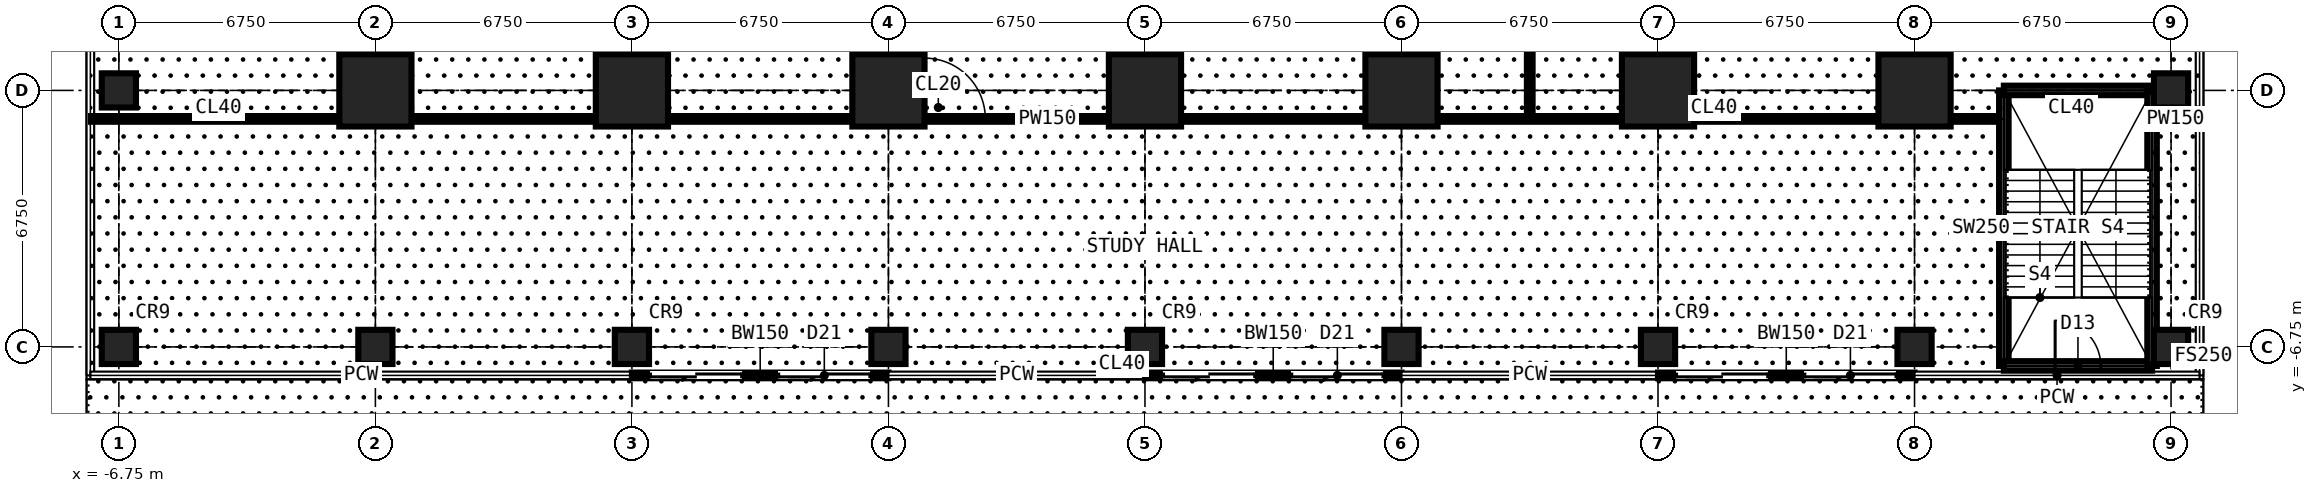
"""IFC4 building model, lengths in metres.
Left out: names, types, materials, properties, quantities, classifications, styles, units other than length and angle.
Written with IfcOpenShell. Run it as: python <this file> out.ifc"""

import sys

from ifc_helpers import new_model, si_unit, direction, frame, frame_2d, origin, origin_with_axes, origin_2d, place, context, subcontext, project, spatial, rectangle, circle, extrude, element, fill, save


model = new_model("IFC4")
c1 = context("Model", 3, precision=1e-05, world=origin(), true_north=direction((0.0, 1.0)))
c2 = subcontext(c1, "Body", "Model", "MODEL_VIEW")
j1 = project(units=[si_unit("LENGTHUNIT", "METRE"), si_unit("PLANEANGLEUNIT", "RADIAN")], contexts=[c1])
p1 = place(None, origin())
s1 = spatial("IfcSite", under=j1, at=p1, CompositionType="ELEMENT")
p2 = place(p1, origin())
s2 = spatial("IfcBuilding", under=s1, at=p2, CompositionType="ELEMENT")
p3 = place(p2, frame((0.0, 0.0, 9.0)))
s3 = spatial("IfcBuildingStorey", under=s2, at=p3, CompositionType="ELEMENT", Elevation=9.0)
for number, where, z_axis, x_axis in (
    (1, (-6.75, -6.75, 0.0), (0.0, 0.0, 1.0), (1.0, 0.0, 0.0)),
    (2, (-6.75, 0.0, 0.0), (0.0, 0.0, 1.0), (1.0, 0.0, 0.0)),
    (3, (0.0, -6.75, 0.0), (0.0, 0.0, 1.0), (1.0, 0.0, 0.0)),
):
    element("IfcColumn", number, at=place(p3, frame(where, z_axis=z_axis, x_axis=x_axis)), inside=s3, PredefinedType="COLUMN", context=c2, shape_type="SweptSolid", body=[
        extrude(circle(Radius=0.45, at=origin_2d()), origin(), (0.0, 0.0, 1.0), 4.5),
    ])
p4 = place(p3, origin_with_axes())
e4 = element("IfcColumn", 4, at=p4, inside=s3, PredefinedType="COLUMN", context=c2, shape_type="SweptSolid", body=[
    extrude(rectangle(XDim=1.9, YDim=1.9, at=origin_2d()), origin(), (0.0, 0.0, 1.0), 4.5),
])
p5 = place(p3, frame((6.75, -6.75, 0.0), z_axis=(0.0, 0.0, 1.0), x_axis=(1.0, 0.0, 0.0)))
e5 = element("IfcColumn", 5, at=p5, inside=s3, PredefinedType="COLUMN", context=c2, shape_type="SweptSolid", body=[
    extrude(circle(Radius=0.45, at=origin_2d()), origin(), (0.0, 0.0, 1.0), 4.5),
])
p6 = place(p3, frame((6.75, 0.0, 0.0), z_axis=(0.0, 0.0, 1.0), x_axis=(1.0, 0.0, 0.0)))
e6 = element("IfcColumn", 6, at=p6, inside=s3, PredefinedType="COLUMN", context=c2, shape_type="SweptSolid", body=[
    extrude(rectangle(XDim=1.9, YDim=1.9, at=origin_2d()), origin(), (0.0, 0.0, 1.0), 4.5),
])
p7 = place(p3, frame((13.5, -6.75, 0.0), z_axis=(0.0, 0.0, 1.0), x_axis=(1.0, 0.0, 0.0)))
e7 = element("IfcColumn", 7, at=p7, inside=s3, PredefinedType="COLUMN", context=c2, shape_type="SweptSolid", body=[
    extrude(circle(Radius=0.45, at=origin_2d()), origin(), (0.0, 0.0, 1.0), 4.5),
])
p8 = place(p3, frame((13.5, 0.0, 0.0), z_axis=(0.0, 0.0, 1.0), x_axis=(1.0, 0.0, 0.0)))
e8 = element("IfcColumn", 8, at=p8, inside=s3, PredefinedType="COLUMN", context=c2, shape_type="SweptSolid", body=[
    extrude(rectangle(XDim=1.9, YDim=1.9, at=origin_2d()), origin(), (0.0, 0.0, 1.0), 4.5),
])
p9 = place(p3, frame((20.25, -6.75, 0.0), z_axis=(0.0, 0.0, 1.0), x_axis=(1.0, 0.0, 0.0)))
e9 = element("IfcColumn", 9, at=p9, inside=s3, PredefinedType="COLUMN", context=c2, shape_type="SweptSolid", body=[
    extrude(circle(Radius=0.45, at=origin_2d()), origin(), (0.0, 0.0, 1.0), 4.5),
])
p10 = place(p3, frame((20.25, 0.0, 0.0), z_axis=(0.0, 0.0, 1.0), x_axis=(1.0, 0.0, 0.0)))
e10 = element("IfcColumn", 10, at=p10, inside=s3, PredefinedType="COLUMN", context=c2, shape_type="SweptSolid", body=[
    extrude(rectangle(XDim=1.9, YDim=1.9, at=origin_2d()), origin(), (0.0, 0.0, 1.0), 4.5),
])
p11 = place(p3, frame((27.0, -6.75, 0.0), z_axis=(0.0, 0.0, 1.0), x_axis=(1.0, 0.0, 0.0)))
e11 = element("IfcColumn", 11, at=p11, inside=s3, PredefinedType="COLUMN", context=c2, shape_type="SweptSolid", body=[
    extrude(circle(Radius=0.45, at=origin_2d()), origin(), (0.0, 0.0, 1.0), 4.5),
])
p12 = place(p3, frame((27.0, 0.0, 0.0), z_axis=(0.0, 0.0, 1.0), x_axis=(1.0, 0.0, 0.0)))
e12 = element("IfcColumn", 12, at=p12, inside=s3, PredefinedType="COLUMN", context=c2, shape_type="SweptSolid", body=[
    extrude(rectangle(XDim=1.9, YDim=1.9, at=origin_2d()), origin(), (0.0, 0.0, 1.0), 4.5),
])
p13 = place(p3, frame((33.75, -6.75, 0.0), z_axis=(0.0, 0.0, 1.0), x_axis=(1.0, 0.0, 0.0)))
e13 = element("IfcColumn", 13, at=p13, inside=s3, PredefinedType="COLUMN", context=c2, shape_type="SweptSolid", body=[
    extrude(circle(Radius=0.45, at=origin_2d()), origin(), (0.0, 0.0, 1.0), 4.5),
])
p14 = place(p3, frame((33.75, 0.0, 0.0), z_axis=(0.0, 0.0, 1.0), x_axis=(1.0, 0.0, 0.0)))
e14 = element("IfcColumn", 14, at=p14, inside=s3, PredefinedType="COLUMN", context=c2, shape_type="SweptSolid", body=[
    extrude(rectangle(XDim=1.9, YDim=1.9, at=origin_2d()), origin(), (0.0, 0.0, 1.0), 4.5),
])
p15 = place(p3, frame((40.5, -6.75, 0.0), z_axis=(0.0, 0.0, 1.0), x_axis=(1.0, 0.0, 0.0)))
e15 = element("IfcColumn", 15, at=p15, inside=s3, PredefinedType="COLUMN", context=c2, shape_type="SweptSolid", body=[
    extrude(circle(Radius=0.45, at=origin_2d()), origin(), (0.0, 0.0, 1.0), 4.5),
])
p16 = place(p3, frame((40.5, 0.0, 0.0), z_axis=(0.0, 0.0, 1.0), x_axis=(1.0, 0.0, 0.0)))
e16 = element("IfcColumn", 16, at=p16, inside=s3, PredefinedType="COLUMN", context=c2, shape_type="SweptSolid", body=[
    extrude(rectangle(XDim=1.9, YDim=1.9, at=origin_2d()), origin(), (0.0, 0.0, 1.0), 4.5),
])
for number, where, z_axis, x_axis in (
    (17, (47.25, -6.75, 0.0), (0.0, 0.0, 1.0), (1.0, 0.0, 0.0)),
    (18, (47.25, 0.0, 0.0), (0.0, 0.0, 1.0), (1.0, 0.0, 0.0)),
):
    element("IfcColumn", number, at=place(p3, frame(where, z_axis=z_axis, x_axis=x_axis)), inside=s3, PredefinedType="COLUMN", context=c2, shape_type="SweptSolid", body=[
        extrude(circle(Radius=0.45, at=origin_2d()), origin(), (0.0, 0.0, 1.0), 4.5),
    ])
p17 = place(p3, frame((13.5, -7.5, 0.0), z_axis=(0.0, 0.0, 1.0), x_axis=(-1.0, 0.0, 0.0)))
e19 = element("IfcWall", 19, at=p17, inside=s3, PredefinedType="SOLIDWALL", context=c2, shape_type="SweptSolid", body=[
    extrude(rectangle(XDim=6.75, YDim=0.15, at=frame_2d((3.375, 0.0))), origin(), (0.0, 0.0, 1.0), 4.25),
])
p18 = place(p17, frame((0.488, 0.0, 0.0)))
e20 = element("IfcOpeningElement", 20, at=p18, cuts=e19, PredefinedType="OPENING", context=c2, shape_type="SweptSolid", body=[
    extrude(rectangle(XDim=2.4, YDim=2.4, at=frame_2d((1.2, 1.2))), frame((0.0, 0.085, 0.0), z_axis=(0.0, -1.0, 0.0), x_axis=(1.0, 0.0, 0.0)), (0.0, 0.0, 1.0), 0.17),
])
p19 = place(p17, frame((3.863, 0.0, 0.0)))
e21 = element("IfcOpeningElement", 21, at=p19, cuts=e19, PredefinedType="OPENING", context=c2, shape_type="SweptSolid", body=[
    extrude(rectangle(XDim=2.4, YDim=2.4, at=frame_2d((1.2, 1.2))), frame((0.0, 0.085, 0.0), z_axis=(0.0, -1.0, 0.0), x_axis=(1.0, 0.0, 0.0)), (0.0, 0.0, 1.0), 0.17),
])
p20 = place(p3, frame((27.0, -7.5, 0.0), z_axis=(0.0, 0.0, 1.0), x_axis=(-1.0, 0.0, 0.0)))
e22 = element("IfcWall", 22, at=p20, inside=s3, PredefinedType="SOLIDWALL", context=c2, shape_type="SweptSolid", body=[
    extrude(rectangle(XDim=6.75, YDim=0.15, at=frame_2d((3.375, 0.0))), origin(), (0.0, 0.0, 1.0), 4.25),
])
p21 = place(p20, frame((0.488, 0.0, 0.0)))
e23 = element("IfcOpeningElement", 23, at=p21, cuts=e22, PredefinedType="OPENING", context=c2, shape_type="SweptSolid", body=[
    extrude(rectangle(XDim=2.4, YDim=2.4, at=frame_2d((1.2, 1.2))), frame((0.0, 0.085, 0.0), z_axis=(0.0, -1.0, 0.0), x_axis=(1.0, 0.0, 0.0)), (0.0, 0.0, 1.0), 0.17),
])
p22 = place(p20, frame((3.863, 0.0, 0.0)))
e24 = element("IfcOpeningElement", 24, at=p22, cuts=e22, PredefinedType="OPENING", context=c2, shape_type="SweptSolid", body=[
    extrude(rectangle(XDim=2.4, YDim=2.4, at=frame_2d((1.2, 1.2))), frame((0.0, 0.085, 0.0), z_axis=(0.0, -1.0, 0.0), x_axis=(1.0, 0.0, 0.0)), (0.0, 0.0, 1.0), 0.17),
])
p23 = place(p3, frame((40.5, -7.5, 0.0), z_axis=(0.0, 0.0, 1.0), x_axis=(-1.0, 0.0, 0.0)))
e25 = element("IfcWall", 25, at=p23, inside=s3, PredefinedType="SOLIDWALL", context=c2, shape_type="SweptSolid", body=[
    extrude(rectangle(XDim=6.75, YDim=0.15, at=frame_2d((3.375, 0.0))), origin(), (0.0, 0.0, 1.0), 4.25),
])
p24 = place(p23, frame((0.488, 0.0, 0.0)))
e26 = element("IfcOpeningElement", 26, at=p24, cuts=e25, PredefinedType="OPENING", context=c2, shape_type="SweptSolid", body=[
    extrude(rectangle(XDim=2.4, YDim=2.4, at=frame_2d((1.2, 1.2))), frame((0.0, 0.085, 0.0), z_axis=(0.0, -1.0, 0.0), x_axis=(1.0, 0.0, 0.0)), (0.0, 0.0, 1.0), 0.17),
])
p25 = place(p23, frame((3.863, 0.0, 0.0)))
e27 = element("IfcOpeningElement", 27, at=p25, cuts=e25, PredefinedType="OPENING", context=c2, shape_type="SweptSolid", body=[
    extrude(rectangle(XDim=2.4, YDim=2.4, at=frame_2d((1.2, 1.2))), frame((0.0, 0.085, 0.0), z_axis=(0.0, -1.0, 0.0), x_axis=(1.0, 0.0, 0.0)), (0.0, 0.0, 1.0), 0.17),
])
p26 = place(p3, frame((-7.484, -0.75, 0.0), z_axis=(0.0, 0.0, 1.0), x_axis=(1.0, 0.0, 0.0)))
e28 = element("IfcWall", 28, at=p26, inside=s3, PredefinedType="PARTITIONING", context=c2, shape_type="SweptSolid", body=[
    extrude(rectangle(XDim=50.334, YDim=0.15, at=frame_2d((25.167, 0.0))), origin(), (0.0, 0.0, 1.0), 4.25),
])
p27 = place(p26, frame((21.934, 0.0, 0.0)))
e29 = element("IfcOpeningElement", 29, at=p27, cuts=e28, PredefinedType="OPENING", context=c2, shape_type="SweptSolid", body=[
    extrude(rectangle(XDim=1.6, YDim=2.4, at=frame_2d((0.8, 1.2))), frame((0.0, 0.085, 0.0), z_axis=(0.0, -1.0, 0.0), x_axis=(1.0, 0.0, 0.0)), (0.0, 0.0, 1.0), 0.17),
])
p28 = place(p3, frame((-0.75, -0.75, 0.0), z_axis=(0.0, 0.0, 1.0), x_axis=(0.0, 1.0, 0.0)))
e30 = element("IfcWall", 30, at=p28, inside=s3, PredefinedType="PARTITIONING", context=c2, shape_type="SweptSolid", body=[
    extrude(rectangle(XDim=41.984, YDim=0.15, at=frame_2d((20.992, 0.0))), origin(), (0.0, 0.0, 1.0), 4.25),
])
p29 = place(p28, frame((4.65, 0.0, 0.0)))
e31 = element("IfcOpeningElement", 31, at=p29, cuts=e30, PredefinedType="OPENING", context=c2, shape_type="SweptSolid", body=[
    extrude(rectangle(XDim=1.6, YDim=2.4, at=frame_2d((0.8, 1.2))), frame((0.0, 0.085, 0.0), z_axis=(0.0, -1.0, 0.0), x_axis=(1.0, 0.0, 0.0)), (0.0, 0.0, 1.0), 0.17),
])
p30 = place(p3, frame((30.375, -0.75, 0.0), z_axis=(0.0, 0.0, 1.0), x_axis=(0.0, 1.0, 0.0)))
e32 = element("IfcWall", 32, at=p30, inside=s3, PredefinedType="PARTITIONING", context=c2, shape_type="SweptSolid", body=[
    extrude(rectangle(XDim=12.05, YDim=0.15, at=frame_2d((6.025, 0.0))), origin(), (0.0, 0.0, 1.0), 4.25),
])
p31 = place(p3, frame((41.25, -0.75, 0.0), z_axis=(0.0, 0.0, 1.0), x_axis=(0.0, 1.0, 0.0)))
e33 = element("IfcWall", 33, at=p31, inside=s3, PredefinedType="PARTITIONING", context=c2, shape_type="SweptSolid", body=[
    extrude(rectangle(XDim=41.984, YDim=0.15, at=frame_2d((20.992, 0.0))), origin(), (0.0, 0.0, 1.0), 4.25),
])
p32 = place(p31, frame((15.2, 0.0, 0.0)))
e34 = element("IfcOpeningElement", 34, at=p32, cuts=e33, PredefinedType="OPENING", context=c2, shape_type="SweptSolid", body=[
    extrude(rectangle(XDim=1.6, YDim=2.4, at=frame_2d((0.8, 1.2))), frame((0.0, 0.085, 0.0), z_axis=(0.0, -1.0, 0.0), x_axis=(1.0, 0.0, 0.0)), (0.0, 0.0, 1.0), 0.17),
])
p33 = place(p3, frame((42.85, -7.25, 0.0), z_axis=(0.0, 0.0, 1.0), x_axis=(0.0, 1.0, 0.0)))
e35 = element("IfcWall", 35, at=p33, inside=s3, PredefinedType="SOLIDWALL", context=c2, shape_type="SweptSolid", body=[
    extrude(rectangle(XDim=7.25, YDim=0.25, at=frame_2d((3.625, 0.0))), origin(), (0.0, 0.0, 1.0), 4.25),
])
p34 = place(p3, frame((42.85, -7.25, 0.0), z_axis=(0.0, 0.0, 1.0), x_axis=(1.0, 0.0, 0.0)))
e36 = element("IfcWall", 36, at=p34, inside=s3, PredefinedType="SOLIDWALL", context=c2, shape_type="SweptSolid", body=[
    extrude(rectangle(XDim=3.9, YDim=0.25, at=frame_2d((1.95, 0.0))), origin(), (0.0, 0.0, 1.0), 4.25),
])
p35 = place(p34, frame((1.35, 0.0, 0.0)))
e37 = element("IfcOpeningElement", 37, at=p35, cuts=e36, PredefinedType="OPENING", context=c2, shape_type="SweptSolid", body=[
    extrude(rectangle(XDim=1.2, YDim=2.2, at=frame_2d((0.6, 1.1))), frame((0.0, 0.135, 0.0), z_axis=(0.0, -1.0, 0.0), x_axis=(1.0, 0.0, 0.0)), (0.0, 0.0, 1.0), 0.27),
])
p36 = place(p3, frame((42.85, 0.0, 0.0), z_axis=(0.0, 0.0, 1.0), x_axis=(1.0, 0.0, 0.0)))
e38 = element("IfcWall", 38, at=p36, inside=s3, PredefinedType="SOLIDWALL", context=c2, shape_type="SweptSolid", body=[
    extrude(rectangle(XDim=3.9, YDim=0.25, at=frame_2d((1.95, 0.0))), origin(), (0.0, 0.0, 1.0), 4.25),
])
p37 = place(p3, frame((46.75, -7.25, 0.0), z_axis=(0.0, 0.0, 1.0), x_axis=(0.0, 1.0, 0.0)))
e39 = element("IfcWall", 39, at=p37, inside=s3, PredefinedType="SOLIDWALL", context=c2, shape_type="SweptSolid", body=[
    extrude(rectangle(XDim=7.25, YDim=0.25, at=frame_2d((3.625, 0.0))), origin(), (0.0, 0.0, 1.0), 4.25),
])
p38 = place(p3, frame((46.75, -0.75, 0.0), z_axis=(0.0, 0.0, 1.0), x_axis=(1.0, 0.0, 0.0)))
e40 = element("IfcWall", 40, at=p38, inside=s3, PredefinedType="PARTITIONING", context=c2, shape_type="SweptSolid", body=[
    extrude(rectangle(XDim=1.234, YDim=0.15, at=frame_2d((0.617, 0.0))), origin(), (0.0, 0.0, 1.0), 4.25),
])
p39 = place(p18, origin())
e41 = element("IfcDoor", 41, at=p39, inside=s3, OperationType="SLIDING_TO_LEFT", PredefinedType="DOOR", context=c2, shape_type="SweptSolid", body=[
    extrude(rectangle(XDim=2.4, YDim=2.4, at=frame_2d((1.2, 1.2))), frame((0.0, 0.025, 0.0), z_axis=(0.0, -1.0, 0.0), x_axis=(1.0, 0.0, 0.0)), (0.0, 0.0, 1.0), 0.05),
])
fill(e20, e41)
p40 = place(p19, origin())
e42 = element("IfcDoor", 42, at=p40, inside=s3, OperationType="SLIDING_TO_LEFT", PredefinedType="DOOR", context=c2, shape_type="SweptSolid", body=[
    extrude(rectangle(XDim=2.4, YDim=2.4, at=frame_2d((1.2, 1.2))), frame((0.0, 0.025, 0.0), z_axis=(0.0, -1.0, 0.0), x_axis=(1.0, 0.0, 0.0)), (0.0, 0.0, 1.0), 0.05),
])
fill(e21, e42)
p41 = place(p21, origin())
e43 = element("IfcDoor", 43, at=p41, inside=s3, OperationType="SLIDING_TO_LEFT", PredefinedType="DOOR", context=c2, shape_type="SweptSolid", body=[
    extrude(rectangle(XDim=2.4, YDim=2.4, at=frame_2d((1.2, 1.2))), frame((0.0, 0.025, 0.0), z_axis=(0.0, -1.0, 0.0), x_axis=(1.0, 0.0, 0.0)), (0.0, 0.0, 1.0), 0.05),
])
fill(e23, e43)
p42 = place(p22, origin())
e44 = element("IfcDoor", 44, at=p42, inside=s3, OperationType="SLIDING_TO_LEFT", PredefinedType="DOOR", context=c2, shape_type="SweptSolid", body=[
    extrude(rectangle(XDim=2.4, YDim=2.4, at=frame_2d((1.2, 1.2))), frame((0.0, 0.025, 0.0), z_axis=(0.0, -1.0, 0.0), x_axis=(1.0, 0.0, 0.0)), (0.0, 0.0, 1.0), 0.05),
])
fill(e24, e44)
p43 = place(p24, origin())
e45 = element("IfcDoor", 45, at=p43, inside=s3, OperationType="SLIDING_TO_LEFT", PredefinedType="DOOR", context=c2, shape_type="SweptSolid", body=[
    extrude(rectangle(XDim=2.4, YDim=2.4, at=frame_2d((1.2, 1.2))), frame((0.0, 0.025, 0.0), z_axis=(0.0, -1.0, 0.0), x_axis=(1.0, 0.0, 0.0)), (0.0, 0.0, 1.0), 0.05),
])
fill(e26, e45)
p44 = place(p25, origin())
e46 = element("IfcDoor", 46, at=p44, inside=s3, OperationType="SLIDING_TO_LEFT", PredefinedType="DOOR", context=c2, shape_type="SweptSolid", body=[
    extrude(rectangle(XDim=2.4, YDim=2.4, at=frame_2d((1.2, 1.2))), frame((0.0, 0.025, 0.0), z_axis=(0.0, -1.0, 0.0), x_axis=(1.0, 0.0, 0.0)), (0.0, 0.0, 1.0), 0.05),
])
fill(e27, e46)
p45 = place(p27, origin())
e47 = element("IfcDoor", 47, at=p45, inside=s3, OperationType="DOUBLE_DOOR_SINGLE_SWING", PredefinedType="DOOR", context=c2, shape_type="SweptSolid", body=[
    extrude(rectangle(XDim=1.6, YDim=2.4, at=frame_2d((0.8, 1.2))), frame((0.0, 0.025, 0.0), z_axis=(0.0, -1.0, 0.0), x_axis=(1.0, 0.0, 0.0)), (0.0, 0.0, 1.0), 0.05),
])
fill(e29, e47)
p46 = place(p35, origin())
e48 = element("IfcDoor", 48, at=p46, inside=s3, OperationType="SINGLE_SWING_LEFT", PredefinedType="DOOR", context=c2, shape_type="SweptSolid", body=[
    extrude(rectangle(XDim=1.2, YDim=2.2, at=frame_2d((0.6, 1.1))), frame((0.0, 0.025, 0.0), z_axis=(0.0, -1.0, 0.0), x_axis=(1.0, 0.0, 0.0)), (0.0, 0.0, 1.0), 0.05),
])
fill(e37, e48)
save(model, sys.argv[1])
